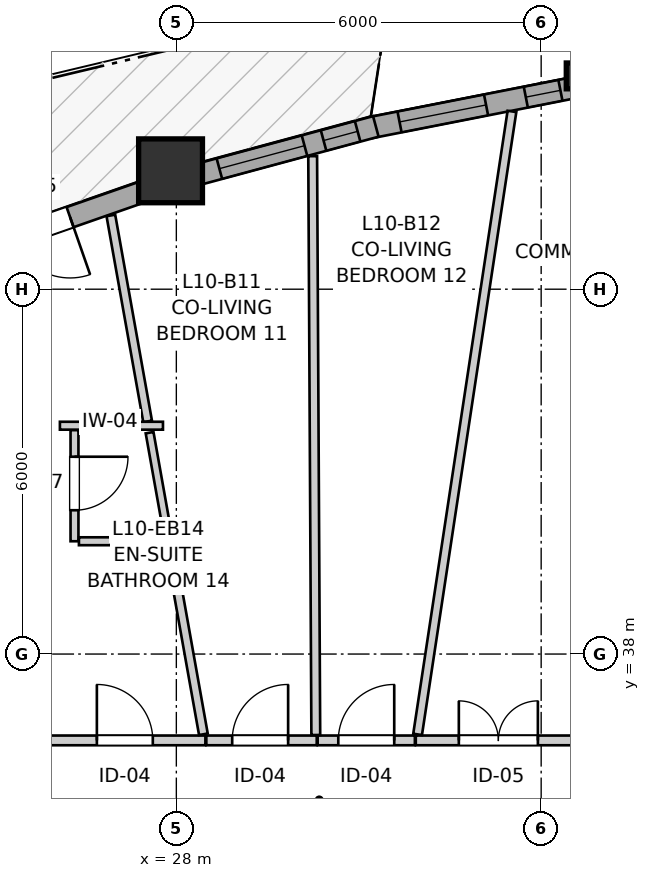
"""IFC4 building model, lengths in metres.
Left out: names, types, materials, properties, quantities, classifications, styles, units other than length and angle.
Written with IfcOpenShell. Run it as: python <this file> out.ifc"""

import sys

from ifc_helpers import new_model, si_unit, direction, frame, frame_2d, origin, origin_2d, place, context, subcontext, project, spatial, rectangle, i_section, extrude, source, transform, mapped, element, fill, save


model = new_model("IFC4")
c1 = context("Model", 3, precision=1e-05, world=origin(), true_north=direction((0.0, 1.0)))
c2 = subcontext(c1, "Body", "Model", "MODEL_VIEW")
j1 = project(units=[si_unit("LENGTHUNIT", "METRE"), si_unit("PLANEANGLEUNIT", "RADIAN")], contexts=[c1])
p1 = place(None, origin())
s1 = spatial("IfcSite", under=j1, at=p1, CompositionType="ELEMENT")
p2 = place(p1, origin())
s2 = spatial("IfcBuilding", under=s1, at=p2, CompositionType="ELEMENT")
p3 = place(p2, frame((0.0, 0.0, 36.6)))
s3 = spatial("IfcBuildingStorey", under=s2, at=p3, CompositionType="ELEMENT", Elevation=36.6)
m1 = source(origin(), c2, "Body", "SweptSolid", [
    extrude(i_section(OverallWidth=0.409, OverallDepth=0.425, WebThickness=0.03, FlangeThickness=0.048, FilletRadius=0.015, at=origin_2d()), origin(), (0.0, 0.0, 1.0), 2.94),
])
p4 = place(p3, frame((34.617, 47.508, 0.0), z_axis=(0.0, 0.0, 1.0), x_axis=(1.0, 0.0, 0.0)))
e1 = element("IfcColumn", 1, at=p4, inside=s3, PredefinedType="PILASTER", context=c2, shape_type="MappedRepresentation", body=[
    mapped(m1, transform((0.0, 0.0, 0.0), x_axis=(1.0, 0.0, 0.0), y_axis=(0.0, 1.0, 0.0), z_axis=(0.0, 0.0, 1.0), scale=1.0)),
])
m2 = source(origin(), c2, "Body", "SweptSolid", [
    extrude(rectangle(XDim=1.05, YDim=1.05, at=origin_2d()), origin(), (0.0, 0.0, 1.0), 2.94),
])
p5 = place(p3, frame((27.905, 45.947, 0.0), z_axis=(0.0, 0.0, 1.0), x_axis=(1.0, 0.0, 0.0)))
e2 = element("IfcColumn", 2, at=p5, inside=s3, PredefinedType="COLUMN", context=c2, shape_type="MappedRepresentation", body=[
    mapped(m2, transform((0.0, 0.0, 0.0), x_axis=(1.0, 0.0, 0.0), y_axis=(0.0, 1.0, 0.0), z_axis=(0.0, 0.0, 1.0), scale=1.0)),
])
p6 = place(p3, frame((34.632, 47.332, 0.0), z_axis=(0.0, 0.0, 1.0), x_axis=(-0.981234691866, -0.192817217796, 0.0)))
e3 = element("IfcWall", 3, at=p6, inside=s3, PredefinedType="SOLIDWALL", context=c2, shape_type="SweptSolid", body=[
    extrude(rectangle(XDim=3.502, YDim=0.35, at=frame_2d((1.751, 0.0))), origin(), (0.0, 0.0, 1.0), 2.42),
])
p7 = place(p6, frame((0.321, 0.0, 0.82)))
e4 = element("IfcOpeningElement", 4, at=p7, cuts=e3, PredefinedType="OPENING", context=c2, shape_type="SweptSolid", body=[
    extrude(rectangle(XDim=0.58, YDim=1.35, at=frame_2d((0.29, 0.675))), frame((0.0, 0.185, 0.0), z_axis=(0.0, -1.0, 0.0), x_axis=(1.0, 0.0, 0.0)), (0.0, 0.0, 1.0), 0.37),
])
p8 = place(p6, frame((1.567, 0.0, 0.82)))
e5 = element("IfcOpeningElement", 5, at=p8, cuts=e3, PredefinedType="OPENING", context=c2, shape_type="SweptSolid", body=[
    extrude(rectangle(XDim=1.45, YDim=1.25, at=frame_2d((0.725, 0.625))), frame((0.0, 0.185, 0.0), z_axis=(0.0, -1.0, 0.0), x_axis=(1.0, 0.0, 0.0)), (0.0, 0.0, 1.0), 0.37),
])
p9 = place(p3, frame((31.281, 46.677, 0.0), z_axis=(0.0, 0.0, 1.0), x_axis=(-0.965445661484, -0.260604441101, 0.0)))
e6 = element("IfcWall", 6, at=p9, inside=s3, PredefinedType="SOLIDWALL", context=c2, shape_type="SweptSolid", body=[
    extrude(rectangle(XDim=3.15, YDim=0.35, at=frame_2d((1.575, 0.0))), origin(), (0.0, 0.0, 1.0), 2.42),
])
p10 = place(p9, frame((0.31, 0.0, 0.82)))
e7 = element("IfcOpeningElement", 7, at=p10, cuts=e6, PredefinedType="OPENING", context=c2, shape_type="SweptSolid", body=[
    extrude(rectangle(XDim=0.58, YDim=1.35, at=frame_2d((0.29, 0.675))), frame((0.0, 0.185, 0.0), z_axis=(0.0, -1.0, 0.0), x_axis=(1.0, 0.0, 0.0)), (0.0, 0.0, 1.0), 0.37),
])
p11 = place(p9, frame((1.215, 0.0, 0.82)))
e8 = element("IfcOpeningElement", 8, at=p11, cuts=e6, PredefinedType="OPENING", context=c2, shape_type="SweptSolid", body=[
    extrude(rectangle(XDim=1.45, YDim=1.25, at=frame_2d((0.725, 0.625))), frame((0.0, 0.185, 0.0), z_axis=(0.0, -1.0, 0.0), x_axis=(1.0, 0.0, 0.0)), (0.0, 0.0, 1.0), 0.37),
])
p12 = place(p3, frame((27.679, 45.683, 0.0), z_axis=(0.0, 0.0, 1.0), x_axis=(-0.944147093892, -0.32952430122, 0.0)))
e9 = element("IfcWall", 9, at=p12, inside=s3, PredefinedType="SOLIDWALL", context=c2, shape_type="SweptSolid", body=[
    extrude(rectangle(XDim=3.094, YDim=0.35, at=frame_2d((1.547, 0.0))), origin(), (0.0, 0.0, 1.0), 2.42),
])
p13 = place(p12, frame((1.511, 0.0, 0.0)))
e10 = element("IfcOpeningElement", 10, at=p13, cuts=e9, PredefinedType="OPENING", context=c2, shape_type="SweptSolid", body=[
    extrude(rectangle(XDim=1.0, YDim=2.1, at=frame_2d((0.5, 1.05))), frame((0.0, 0.185, 0.0), z_axis=(0.0, -1.0, 0.0), x_axis=(1.0, 0.0, 0.0)), (0.0, 0.0, 1.0), 0.37),
])
p14 = place(p3, frame((31.938, 36.58, 0.0), z_axis=(0.0, 0.0, 1.0), x_axis=(1.0, 0.0, 0.0)))
e11 = element("IfcWall", 11, at=p14, inside=s3, PredefinedType="PARTITIONING", context=c2, shape_type="SweptSolid", body=[
    extrude(rectangle(XDim=2.718, YDim=0.16, at=frame_2d((1.359, 0.0))), origin(), (0.0, 0.0, 1.0), 2.94),
])
p15 = place(p14, frame((0.708, 0.0, 0.0)))
e12 = element("IfcOpeningElement", 12, at=p15, cuts=e11, PredefinedType="OPENING", context=c2, shape_type="SweptSolid", body=[
    extrude(rectangle(XDim=1.3, YDim=2.1, at=frame_2d((0.65, 1.05))), frame((0.0, 0.09, 0.0), z_axis=(0.0, -1.0, 0.0), x_axis=(1.0, 0.0, 0.0)), (0.0, 0.0, 1.0), 0.18),
])
p16 = place(p3, frame((25.874, 36.58, 0.0), z_axis=(0.0, 0.0, 1.0), x_axis=(1.0, 0.0, 0.0)))
e13 = element("IfcWall", 13, at=p16, inside=s3, PredefinedType="PARTITIONING", context=c2, shape_type="SweptSolid", body=[
    extrude(rectangle(XDim=2.604, YDim=0.16, at=frame_2d((1.302, 0.0))), origin(), (0.0, 0.0, 1.0), 2.94),
])
p17 = place(p16, frame((0.819, 0.0, 0.0)))
e14 = element("IfcOpeningElement", 14, at=p17, cuts=e13, PredefinedType="OPENING", context=c2, shape_type="SweptSolid", body=[
    extrude(rectangle(XDim=0.92, YDim=2.1, at=frame_2d((0.46, 1.05))), frame((0.0, 0.09, 0.0), z_axis=(0.0, -1.0, 0.0), x_axis=(1.0, 0.0, 0.0)), (0.0, 0.0, 1.0), 0.18),
])
p18 = place(p3, frame((26.325, 41.682, 0.0), z_axis=(0.0, 0.0, 1.0), x_axis=(0.0, -1.0, 0.0)))
e15 = element("IfcWall", 15, at=p18, inside=s3, PredefinedType="PARTITIONING", context=c2, shape_type="SweptSolid", body=[
    extrude(rectangle(XDim=1.827, YDim=0.13, at=frame_2d((0.914, 0.0))), origin(), (0.0, 0.0, 1.0), 2.94),
])
p19 = place(p18, frame((0.437, 0.0, 0.0)))
e16 = element("IfcOpeningElement", 16, at=p19, cuts=e15, PredefinedType="OPENING", context=c2, shape_type="SweptSolid", body=[
    extrude(rectangle(XDim=0.88, YDim=2.05, at=frame_2d((0.44, 1.025))), frame((0.0, 0.075, 0.0), z_axis=(0.0, -1.0, 0.0), x_axis=(1.0, 0.0, 0.0)), (0.0, 0.0, 1.0), 0.15),
])
p20 = place(p3, frame((28.493, 36.58, 0.0), z_axis=(0.0, 0.0, 1.0), x_axis=(1.0, 0.0, 0.0)))
e17 = element("IfcWall", 17, at=p20, inside=s3, PredefinedType="PARTITIONING", context=c2, shape_type="SweptSolid", body=[
    extrude(rectangle(XDim=1.816, YDim=0.16, at=frame_2d((0.908, 0.0))), origin(), (0.0, 0.0, 1.0), 2.94),
])
p21 = place(p20, frame((0.426, 0.0, 0.0)))
e18 = element("IfcOpeningElement", 18, at=p21, cuts=e17, PredefinedType="OPENING", context=c2, shape_type="SweptSolid", body=[
    extrude(rectangle(XDim=0.92, YDim=2.1, at=frame_2d((0.46, 1.05))), frame((0.0, 0.09, 0.0), z_axis=(0.0, -1.0, 0.0), x_axis=(1.0, 0.0, 0.0)), (0.0, 0.0, 1.0), 0.18),
])
p22 = place(p3, frame((30.324, 36.58, 0.0), z_axis=(0.0, 0.0, 1.0), x_axis=(1.0, 0.0, 0.0)))
e19 = element("IfcWall", 19, at=p22, inside=s3, PredefinedType="PARTITIONING", context=c2, shape_type="SweptSolid", body=[
    extrude(rectangle(XDim=1.599, YDim=0.16, at=frame_2d((0.8, 0.0))), origin(), (0.0, 0.0, 1.0), 2.94),
])
p23 = place(p22, frame((0.34, 0.0, 0.0)))
e20 = element("IfcOpeningElement", 20, at=p23, cuts=e19, PredefinedType="OPENING", context=c2, shape_type="SweptSolid", body=[
    extrude(rectangle(XDim=0.92, YDim=2.1, at=frame_2d((0.46, 1.05))), frame((0.0, 0.09, 0.0), z_axis=(0.0, -1.0, 0.0), x_axis=(1.0, 0.0, 0.0)), (0.0, 0.0, 1.0), 0.18),
])
p24 = place(p3, frame((31.968, 36.679, 0.0), z_axis=(0.0, 0.0, 1.0), x_axis=(0.149735581821, 0.9887260771, 0.0)))
e21 = element("IfcWall", 21, at=p24, inside=s3, PredefinedType="PARTITIONING", context=c2, shape_type="SweptSolid", body=[
    extrude(rectangle(XDim=10.362, YDim=0.145, at=frame_2d((5.181, 0.0))), origin(), (0.0, 0.0, 1.0), 2.94),
])
p25 = place(p3, frame((30.242, 46.188, 0.0), z_axis=(0.0, 0.0, 1.0), x_axis=(0.00538564204, -0.999985497325, 0.0)))
e22 = element("IfcWall", 22, at=p25, inside=s3, PredefinedType="PARTITIONING", context=c2, shape_type="SweptSolid", body=[
    extrude(rectangle(XDim=9.52, YDim=0.145, at=frame_2d((4.76, 0.0))), origin(), (0.0, 0.0, 1.0), 2.94),
])
p26 = place(p3, frame((26.923, 45.213, 0.0), z_axis=(0.0, 0.0, 1.0), x_axis=(0.175687492323, -0.98444598889, 0.0)))
e23 = element("IfcWall", 23, at=p26, inside=s3, PredefinedType="PARTITIONING", context=c2, shape_type="SweptSolid", body=[
    extrude(rectangle(XDim=3.441, YDim=0.145, at=frame_2d((1.72, 0.0))), origin(), (0.0, 0.0, 1.0), 2.94),
])
p27 = place(p3, frame((27.876, 39.87, 0.0), z_axis=(0.0, 0.0, 1.0), x_axis=(0.175655014507, -0.984451784436, 0.0)))
e24 = element("IfcWall", 24, at=p27, inside=s3, PredefinedType="PARTITIONING", context=c2, shape_type="SweptSolid", body=[
    extrude(rectangle(XDim=3.24, YDim=0.145, at=frame_2d((1.62, 0.0))), origin(), (0.0, 0.0, 1.0), 2.94),
])
p28 = place(p3, frame((27.56, 41.641, 0.0), z_axis=(0.0, 0.0, 1.0), x_axis=(0.175463771609, -0.9844858886, 0.0)))
e25 = element("IfcWall", 25, at=p28, inside=s3, PredefinedType="PARTITIONING", context=c2, shape_type="SweptSolid", body=[
    extrude(rectangle(XDim=1.784, YDim=0.13, at=frame_2d((0.892, 0.0))), origin(), (0.0, 0.0, 1.0), 2.94),
])
p29 = place(p3, frame((26.398, 39.855, 0.0), z_axis=(0.0, 0.0, 1.0), x_axis=(1.0, 0.0, 0.0)))
e26 = element("IfcWall", 26, at=p29, inside=s3, PredefinedType="PARTITIONING", context=c2, shape_type="SweptSolid", body=[
    extrude(rectangle(XDim=1.388, YDim=0.13, at=frame_2d((0.694, 0.0))), origin(), (0.0, 0.0, 1.0), 2.94),
])
p30 = place(p3, frame((26.085, 41.755, 0.0), z_axis=(0.0, 0.0, 1.0), x_axis=(1.0, 0.0, 0.0)))
e27 = element("IfcWall", 27, at=p30, inside=s3, PredefinedType="PARTITIONING", context=c2, shape_type="SweptSolid", body=[
    extrude(rectangle(XDim=1.695, YDim=0.13, at=frame_2d((0.848, 0.0))), origin(), (0.0, 0.0, 1.0), 2.508),
])
m3 = source(origin(), c2, "Body", "SweptSolid", [
    extrude(rectangle(XDim=0.58, YDim=1.35, at=frame_2d((0.29, 0.675))), frame((0.0, 0.03, 0.0), z_axis=(0.0, -1.0, 0.0), x_axis=(1.0, 0.0, 0.0)), (0.0, 0.0, 1.0), 0.06),
])
p31 = place(p7, origin())
e28 = element("IfcWindow", 28, at=p31, inside=s3, PartitioningType="SINGLE_PANEL", PredefinedType="WINDOW", context=c2, shape_type="MappedRepresentation", body=[
    mapped(m3, transform((0.0, 0.0, 0.0), x_axis=(1.0, 0.0, 0.0), y_axis=(0.0, 1.0, 0.0), z_axis=(0.0, 0.0, 1.0), scale=1.0)),
])
fill(e4, e28)
m4 = source(origin(), c2, "Body", "SweptSolid", [
    extrude(rectangle(XDim=1.45, YDim=1.25, at=frame_2d((0.725, 0.625))), frame((0.0, 0.03, 0.0), z_axis=(0.0, -1.0, 0.0), x_axis=(1.0, 0.0, 0.0)), (0.0, 0.0, 1.0), 0.06),
])
p32 = place(p8, origin())
e29 = element("IfcWindow", 29, at=p32, inside=s3, PartitioningType="SINGLE_PANEL", PredefinedType="WINDOW", context=c2, shape_type="MappedRepresentation", body=[
    mapped(m4, transform((0.0, 0.0, 0.0), x_axis=(1.0, 0.0, 0.0), y_axis=(0.0, 1.0, 0.0), z_axis=(0.0, 0.0, 1.0), scale=1.0)),
])
fill(e5, e29)
p33 = place(p10, origin())
e30 = element("IfcWindow", 30, at=p33, inside=s3, PartitioningType="SINGLE_PANEL", PredefinedType="WINDOW", context=c2, shape_type="MappedRepresentation", body=[
    mapped(m3, transform((0.0, 0.0, 0.0), x_axis=(1.0, 0.0, 0.0), y_axis=(0.0, 1.0, 0.0), z_axis=(0.0, 0.0, 1.0), scale=1.0)),
])
fill(e7, e30)
p34 = place(p11, origin())
e31 = element("IfcWindow", 31, at=p34, inside=s3, PartitioningType="SINGLE_PANEL", PredefinedType="WINDOW", context=c2, shape_type="MappedRepresentation", body=[
    mapped(m4, transform((0.0, 0.0, 0.0), x_axis=(1.0, 0.0, 0.0), y_axis=(0.0, 1.0, 0.0), z_axis=(0.0, 0.0, 1.0), scale=1.0)),
])
fill(e8, e31)
m5 = source(origin(), c2, "Body", "SweptSolid", [
    extrude(rectangle(XDim=1.0, YDim=2.1, at=frame_2d((0.5, 1.05))), frame((0.0, 0.025, 0.0), z_axis=(0.0, -1.0, 0.0), x_axis=(1.0, 0.0, 0.0)), (0.0, 0.0, 1.0), 0.05),
])
p35 = place(p13, origin())
e32 = element("IfcDoor", 32, at=p35, inside=s3, OperationType="SINGLE_SWING_LEFT", PredefinedType="DOOR", context=c2, shape_type="MappedRepresentation", body=[
    mapped(m5, transform((0.0, 0.0, 0.0), x_axis=(1.0, 0.0, 0.0), y_axis=(0.0, 1.0, 0.0), z_axis=(0.0, 0.0, 1.0), scale=1.0)),
])
fill(e10, e32)
m6 = source(origin(), c2, "Body", "SweptSolid", [
    extrude(rectangle(XDim=1.3, YDim=2.1, at=frame_2d((0.65, 1.05))), frame((0.0, 0.025, 0.0), z_axis=(0.0, -1.0, 0.0), x_axis=(1.0, 0.0, 0.0)), (0.0, 0.0, 1.0), 0.05),
])
p36 = place(p15, origin())
e33 = element("IfcDoor", 33, at=p36, inside=s3, OperationType="DOUBLE_DOOR_SINGLE_SWING", PredefinedType="DOOR", context=c2, shape_type="MappedRepresentation", body=[
    mapped(m6, transform((0.0, 0.0, 0.0), x_axis=(1.0, 0.0, 0.0), y_axis=(0.0, 1.0, 0.0), z_axis=(0.0, 0.0, 1.0), scale=1.0)),
])
fill(e12, e33)
m7 = source(origin(), c2, "Body", "SweptSolid", [
    extrude(rectangle(XDim=0.92, YDim=2.1, at=frame_2d((0.46, 1.05))), frame((0.0, 0.025, 0.0), z_axis=(0.0, -1.0, 0.0), x_axis=(1.0, 0.0, 0.0)), (0.0, 0.0, 1.0), 0.05),
])
p37 = place(p17, origin())
e34 = element("IfcDoor", 34, at=p37, inside=s3, OperationType="SINGLE_SWING_LEFT", PredefinedType="DOOR", context=c2, shape_type="MappedRepresentation", body=[
    mapped(m7, transform((0.0, 0.0, 0.0), x_axis=(1.0, 0.0, 0.0), y_axis=(0.0, 1.0, 0.0), z_axis=(0.0, 0.0, 1.0), scale=1.0)),
])
fill(e14, e34)
m8 = source(origin(), c2, "Body", "SweptSolid", [
    extrude(rectangle(XDim=0.88, YDim=2.05, at=frame_2d((0.44, 1.025))), frame((0.0, 0.025, 0.0), z_axis=(0.0, -1.0, 0.0), x_axis=(1.0, 0.0, 0.0)), (0.0, 0.0, 1.0), 0.05),
])
p38 = place(p19, origin())
e35 = element("IfcDoor", 35, at=p38, inside=s3, OperationType="SINGLE_SWING_LEFT", PredefinedType="DOOR", context=c2, shape_type="MappedRepresentation", body=[
    mapped(m8, transform((0.0, 0.0, 0.0), x_axis=(1.0, 0.0, 0.0), y_axis=(0.0, 1.0, 0.0), z_axis=(0.0, 0.0, 1.0), scale=1.0)),
])
fill(e16, e35)
p39 = place(p21, origin())
e36 = element("IfcDoor", 36, at=p39, inside=s3, OperationType="SINGLE_SWING_RIGHT", PredefinedType="DOOR", context=c2, shape_type="MappedRepresentation", body=[
    mapped(m7, transform((0.0, 0.0, 0.0), x_axis=(1.0, 0.0, 0.0), y_axis=(0.0, 1.0, 0.0), z_axis=(0.0, 0.0, 1.0), scale=1.0)),
])
fill(e18, e36)
p40 = place(p23, origin())
e37 = element("IfcDoor", 37, at=p40, inside=s3, OperationType="SINGLE_SWING_RIGHT", PredefinedType="DOOR", context=c2, shape_type="MappedRepresentation", body=[
    mapped(m7, transform((0.0, 0.0, 0.0), x_axis=(1.0, 0.0, 0.0), y_axis=(0.0, 1.0, 0.0), z_axis=(0.0, 0.0, 1.0), scale=1.0)),
])
fill(e20, e37)
save(model, sys.argv[1])
